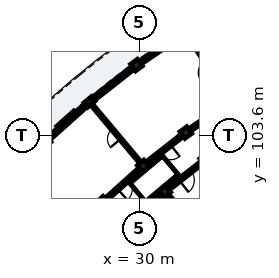
"""IFC4 building model, lengths in metres.
Left out: names, types, materials, properties, quantities, classifications, styles, units other than length and angle.
Written with IfcOpenShell. Run it as: python <this file> out.ifc"""

import sys

from ifc_helpers import new_model, si_unit, direction, frame, frame_2d, origin, origin_2d, place, context, subcontext, project, spatial, rectangle, extrude, element, fill, save


model = new_model("IFC4")
c1 = context("Model", 3, precision=1e-05, world=origin(), true_north=direction((0.0, 1.0)))
c2 = subcontext(c1, "Body", "Model", "MODEL_VIEW")
j1 = project(units=[si_unit("LENGTHUNIT", "METRE"), si_unit("PLANEANGLEUNIT", "RADIAN")], contexts=[c1])
p1 = place(None, origin())
s1 = spatial("IfcSite", under=j1, at=p1, CompositionType="ELEMENT")
p2 = place(p1, origin())
s2 = spatial("IfcBuilding", under=s1, at=p2, CompositionType="ELEMENT")
p3 = place(p2, frame((0.0, 0.0, 15.56)))
s3 = spatial("IfcBuildingStorey", under=s2, at=p3, CompositionType="ELEMENT", Elevation=15.56)
for number, where, z_axis, x_axis in (
    (1, (33.061, 103.804, 0.0), (0.0, 0.0, 1.0), (-0.591, 0.807, 0.0)),
    (2, (29.811, 108.241, 0.0), (0.0, 0.0, 1.0), (-0.591, 0.807, 0.0)),
    (3, (31.671, 99.919, 0.0), (0.0, 0.0, 1.0), (-0.643, 0.766, 0.0)),
    (4, (30.257, 101.605, 0.0), (0.0, 0.0, 1.0), (-0.643, 0.766, 0.0)),
):
    element("IfcColumn", number, at=place(p3, frame(where, z_axis=z_axis, x_axis=x_axis)), inside=s3, PredefinedType="COLUMN", context=c2, shape_type="SweptSolid", body=[
        extrude(rectangle(XDim=0.55, YDim=0.55, at=origin_2d()), origin(), (0.0, 0.0, 1.0), 3.11),
    ])
p4 = place(p3, frame((26.722, 105.818, 0.0), z_axis=(0.0, 0.0, 1.0), x_axis=(-0.642787636427, 0.766044420681, 0.0)))
e5 = element("IfcColumn", 5, at=p4, inside=s3, PredefinedType="PILASTER", context=c2, shape_type="SweptSolid", body=[
    extrude(rectangle(XDim=0.38, YDim=0.62, at=origin_2d()), origin(), (0.0, 0.0, 1.0), 3.11),
])
p5 = place(p3, frame((27.605, 99.226, 0.0), z_axis=(0.0, 0.0, 1.0), x_axis=(-0.691863214436, 0.722028595355, 0.0)))
e6 = element("IfcColumn", 6, at=p5, inside=s3, PredefinedType="COLUMN", context=c2, shape_type="SweptSolid", body=[
    extrude(rectangle(XDim=0.55, YDim=0.55, at=origin_2d()), origin(), (0.0, 0.0, 1.0), 3.11),
])
p6 = place(p3, frame((32.92, 110.365, 0.0), z_axis=(0.0, 0.0, 1.0), x_axis=(-0.825745840472, -0.56404238045, 0.0)))
e7 = element("IfcWall", 7, at=p6, inside=s3, PredefinedType="SOLIDWALL", context=c2, shape_type="SweptSolid", body=[
    extrude(rectangle(XDim=3.521, YDim=0.245, at=frame_2d((1.76, 0.0))), origin(), (0.0, 0.0, 1.0), 2.355),
])
p7 = place(p6, frame((1.08, 0.0, 0.55)))
e8 = element("IfcOpeningElement", 8, at=p7, cuts=e7, PredefinedType="OPENING", context=c2, shape_type="SweptSolid", body=[
    extrude(rectangle(XDim=1.36, YDim=1.61, at=frame_2d((0.68, 0.805))), frame((0.0, 0.133, 0.0), z_axis=(0.0, -1.0, 0.0), x_axis=(1.0, 0.0, 0.0)), (0.0, 0.0, 1.0), 0.265),
])
p8 = place(p3, frame((29.618, 108.09, 0.0), z_axis=(0.0, 0.0, 1.0), x_axis=(-0.786813798172, -0.617190446301, 0.0)))
e9 = element("IfcWall", 9, at=p8, inside=s3, PredefinedType="SOLIDWALL", context=c2, shape_type="SweptSolid", body=[
    extrude(rectangle(XDim=3.521, YDim=0.245, at=frame_2d((1.76, 0.0))), origin(), (0.0, 0.0, 1.0), 2.355),
])
p9 = place(p8, frame((1.02, 0.0, 0.55)))
e10 = element("IfcOpeningElement", 10, at=p9, cuts=e9, PredefinedType="OPENING", context=c2, shape_type="SweptSolid", body=[
    extrude(rectangle(XDim=1.48, YDim=1.46, at=frame_2d((0.74, 0.73))), frame((0.0, 0.133, 0.0), z_axis=(0.0, -1.0, 0.0), x_axis=(1.0, 0.0, 0.0)), (0.0, 0.0, 1.0), 0.265),
])
p10 = place(p3, frame((26.603, 105.711, 0.0), z_axis=(0.0, 0.0, 1.0), x_axis=(-0.744413726571, -0.667718656092, 0.0)))
e11 = element("IfcWall", 11, at=p10, inside=s3, PredefinedType="SOLIDWALL", context=c2, shape_type="SweptSolid", body=[
    extrude(rectangle(XDim=3.521, YDim=0.245, at=frame_2d((1.76, 0.0))), origin(), (0.0, 0.0, 1.0), 2.355),
])
p11 = place(p10, frame((0.96, 0.0, 0.55)))
e12 = element("IfcOpeningElement", 12, at=p11, cuts=e11, PredefinedType="OPENING", context=c2, shape_type="SweptSolid", body=[
    extrude(rectangle(XDim=1.6, YDim=1.535, at=frame_2d((0.8, 0.768))), frame((0.0, 0.133, 0.0), z_axis=(0.0, -1.0, 0.0), x_axis=(1.0, 0.0, 0.0)), (0.0, 0.0, 1.0), 0.265),
])
p12 = place(p3, frame((35.789, 106.151, 0.0), z_axis=(0.0, 0.0, 1.0), x_axis=(-0.536492262982, 0.843905238614, 0.0)))
e13 = element("IfcWall", 13, at=p12, inside=s3, PredefinedType="PARTITIONING", context=c2, shape_type="SweptSolid", body=[
    extrude(rectangle(XDim=4.7, YDim=0.125, at=frame_2d((2.35, 0.0))), origin(), (0.0, 0.0, 1.0), 2.37),
])
p13 = place(p12, frame((1.905, 0.0, 0.0)))
e14 = element("IfcOpeningElement", 14, at=p13, cuts=e13, PredefinedType="OPENING", context=c2, shape_type="SweptSolid", body=[
    extrude(rectangle(XDim=0.89, YDim=2.1, at=frame_2d((0.445, 1.05))), frame((0.0, 0.073, 0.0), z_axis=(0.0, -1.0, 0.0), x_axis=(1.0, 0.0, 0.0)), (0.0, 0.0, 1.0), 0.145),
])
p14 = place(p3, frame((35.714, 105.616, 0.0), z_axis=(0.0, 0.0, 1.0), x_axis=(-0.825779671787, -0.563992848947, 0.0)))
e15 = element("IfcWall", 15, at=p14, inside=s3, PredefinedType="PARTITIONING", context=c2, shape_type="SweptSolid", body=[
    extrude(rectangle(XDim=2.863, YDim=0.205, at=frame_2d((1.432, 0.0))), origin(), (0.0, 0.0, 1.0), 2.37),
])
p15 = place(p14, frame((0.967, 0.0, 0.0)))
e16 = element("IfcOpeningElement", 16, at=p15, cuts=e15, PredefinedType="OPENING", context=c2, shape_type="SweptSolid", body=[
    extrude(rectangle(XDim=0.93, YDim=2.12, at=frame_2d((0.465, 1.06))), frame((0.0, 0.113, 0.0), z_axis=(0.0, -1.0, 0.0), x_axis=(1.0, 0.0, 0.0)), (0.0, 0.0, 1.0), 0.225),
])
p16 = place(p3, frame((32.785, 103.588, 0.0), z_axis=(0.0, 0.0, 1.0), x_axis=(-0.786806323554, -0.617199975061, 0.0)))
e17 = element("IfcWall", 17, at=p16, inside=s3, PredefinedType="PARTITIONING", context=c2, shape_type="SweptSolid", body=[
    extrude(rectangle(XDim=2.863, YDim=0.205, at=frame_2d((1.432, 0.0))), origin(), (0.0, 0.0, 1.0), 2.37),
])
p17 = place(p16, frame((0.937, 0.0, 0.0)))
e18 = element("IfcOpeningElement", 18, at=p17, cuts=e17, PredefinedType="OPENING", context=c2, shape_type="SweptSolid", body=[
    extrude(rectangle(XDim=0.99, YDim=2.16, at=frame_2d((0.495, 1.08))), frame((0.0, 0.113, 0.0), z_axis=(0.0, -1.0, 0.0), x_axis=(1.0, 0.0, 0.0)), (0.0, 0.0, 1.0), 0.225),
])
p18 = place(p3, frame((34.085, 101.813, 0.0), z_axis=(0.0, 0.0, 1.0), x_axis=(-0.786835457019, -0.617162833924, 0.0)))
e19 = element("IfcWall", 19, at=p18, inside=s3, PredefinedType="PARTITIONING", context=c2, shape_type="SweptSolid", body=[
    extrude(rectangle(XDim=2.718, YDim=0.205, at=frame_2d((1.359, 0.0))), origin(), (0.0, 0.0, 1.0), 2.37),
])
p19 = place(p18, frame((0.864, 0.0, 0.0)))
e20 = element("IfcOpeningElement", 20, at=p19, cuts=e19, PredefinedType="OPENING", context=c2, shape_type="SweptSolid", body=[
    extrude(rectangle(XDim=0.99, YDim=2.16, at=frame_2d((0.495, 1.08))), frame((0.0, 0.113, 0.0), z_axis=(0.0, -1.0, 0.0), x_axis=(1.0, 0.0, 0.0)), (0.0, 0.0, 1.0), 0.225),
])
p20 = place(p3, frame((30.0, 101.911, 0.0), z_axis=(0.0, 0.0, 1.0), x_axis=(-0.642811926223, 0.766024038465, 0.0)))
e21 = element("IfcWall", 21, at=p20, inside=s3, PredefinedType="PLUMBINGWALL", context=c2, shape_type="SweptSolid", body=[
    extrude(rectangle(XDim=4.7, YDim=0.14, at=frame_2d((2.35, 0.0))), origin(), (0.0, 0.0, 1.0), 2.37),
])
p21 = place(p20, frame((1.92, 0.0, 0.0)))
e22 = element("IfcOpeningElement", 22, at=p21, cuts=e21, PredefinedType="OPENING", context=c2, shape_type="SweptSolid", body=[
    extrude(rectangle(XDim=0.86, YDim=2.06, at=frame_2d((0.43, 1.03))), frame((0.0, 0.08, 0.0), z_axis=(0.0, -1.0, 0.0), x_axis=(1.0, 0.0, 0.0)), (0.0, 0.0, 1.0), 0.16),
])
p22 = place(p3, frame((36.171, 94.557, 0.0), z_axis=(0.0, 0.0, 1.0), x_axis=(-0.642789470807, 0.766042881449, 0.0)))
e23 = element("IfcWall", 23, at=p22, inside=s3, PredefinedType="PARTITIONING", context=c2, shape_type="SweptSolid", body=[
    extrude(rectangle(XDim=6.6, YDim=0.185, at=frame_2d((3.3, 0.0))), origin(), (0.0, 0.0, 1.0), 2.37),
])
p23 = place(p3, frame((29.997, 101.371, 0.0), z_axis=(0.0, 0.0, 1.0), x_axis=(-0.744433521088, -0.667696587291, 0.0)))
e24 = element("IfcWall", 24, at=p23, inside=s3, PredefinedType="PARTITIONING", context=c2, shape_type="SweptSolid", body=[
    extrude(rectangle(XDim=2.863, YDim=0.205, at=frame_2d((1.432, 0.0))), origin(), (0.0, 0.0, 1.0), 2.37),
])
p24 = place(p23, frame((0.947, 0.0, 0.0)))
e25 = element("IfcOpeningElement", 25, at=p24, cuts=e24, PredefinedType="OPENING", context=c2, shape_type="SweptSolid", body=[
    extrude(rectangle(XDim=0.97, YDim=2.15, at=frame_2d((0.485, 1.075))), frame((0.0, 0.113, 0.0), z_axis=(0.0, -1.0, 0.0), x_axis=(1.0, 0.0, 0.0)), (0.0, 0.0, 1.0), 0.225),
])
p25 = place(p3, frame((31.411, 99.686, 0.0), z_axis=(0.0, 0.0, 1.0), x_axis=(-0.744418559135, -0.667713268413, 0.0)))
e26 = element("IfcWall", 26, at=p25, inside=s3, PredefinedType="PARTITIONING", context=c2, shape_type="SweptSolid", body=[
    extrude(rectangle(XDim=2.718, YDim=0.205, at=frame_2d((1.359, 0.0))), origin(), (0.0, 0.0, 1.0), 2.37),
])
p26 = place(p25, frame((0.874, 0.0, 0.0)))
e27 = element("IfcOpeningElement", 27, at=p26, cuts=e26, PredefinedType="OPENING", context=c2, shape_type="SweptSolid", body=[
    extrude(rectangle(XDim=0.97, YDim=2.15, at=frame_2d((0.485, 1.075))), frame((0.0, 0.113, 0.0), z_axis=(0.0, -1.0, 0.0), x_axis=(1.0, 0.0, 0.0)), (0.0, 0.0, 1.0), 0.225),
])
p27 = place(p3, frame((24.82, 96.947, 0.0), z_axis=(0.0, 0.0, 1.0), x_axis=(-0.737934199263, 0.674872667663, 0.0)))
e28 = element("IfcWall", 28, at=p27, inside=s3, PredefinedType="PARTITIONING", context=c2, shape_type="SweptSolid", body=[
    extrude(rectangle(XDim=4.7, YDim=0.125, at=frame_2d((2.35, 0.0))), origin(), (0.0, 0.0, 1.0), 2.37),
])
p28 = place(p27, frame((1.915, 0.0, 0.0)))
e29 = element("IfcOpeningElement", 29, at=p28, cuts=e28, PredefinedType="OPENING", context=c2, shape_type="SweptSolid", body=[
    extrude(rectangle(XDim=0.87, YDim=2.08, at=frame_2d((0.435, 1.04))), frame((0.0, 0.073, 0.0), z_axis=(0.0, -1.0, 0.0), x_axis=(1.0, 0.0, 0.0)), (0.0, 0.0, 1.0), 0.145),
])
p29 = place(p7, origin())
e30 = element("IfcWindow", 30, at=p29, inside=s3, PartitioningType="SINGLE_PANEL", PredefinedType="WINDOW", context=c2, shape_type="SweptSolid", body=[
    extrude(rectangle(XDim=1.36, YDim=1.61, at=frame_2d((0.68, 0.805))), frame((0.0, 0.03, 0.0), z_axis=(0.0, -1.0, 0.0), x_axis=(1.0, 0.0, 0.0)), (0.0, 0.0, 1.0), 0.06),
])
fill(e8, e30)
p30 = place(p9, origin())
e31 = element("IfcWindow", 31, at=p30, inside=s3, PartitioningType="SINGLE_PANEL", PredefinedType="WINDOW", context=c2, shape_type="SweptSolid", body=[
    extrude(rectangle(XDim=1.48, YDim=1.46, at=frame_2d((0.74, 0.73))), frame((0.0, 0.03, 0.0), z_axis=(0.0, -1.0, 0.0), x_axis=(1.0, 0.0, 0.0)), (0.0, 0.0, 1.0), 0.06),
])
fill(e10, e31)
p31 = place(p11, origin())
e32 = element("IfcWindow", 32, at=p31, inside=s3, PartitioningType="SINGLE_PANEL", PredefinedType="WINDOW", context=c2, shape_type="SweptSolid", body=[
    extrude(rectangle(XDim=1.6, YDim=1.535, at=frame_2d((0.8, 0.768))), frame((0.0, 0.03, 0.0), z_axis=(0.0, -1.0, 0.0), x_axis=(1.0, 0.0, 0.0)), (0.0, 0.0, 1.0), 0.06),
])
fill(e12, e32)
p32 = place(p17, origin())
e33 = element("IfcDoor", 33, at=p32, inside=s3, OperationType="SINGLE_SWING_LEFT", PredefinedType="DOOR", context=c2, shape_type="SweptSolid", body=[
    extrude(rectangle(XDim=0.99, YDim=2.16, at=frame_2d((0.495, 1.08))), frame((0.0, 0.025, 0.0), z_axis=(0.0, -1.0, 0.0), x_axis=(1.0, 0.0, 0.0)), (0.0, 0.0, 1.0), 0.05),
])
fill(e18, e33)
p33 = place(p19, origin())
e34 = element("IfcDoor", 34, at=p33, inside=s3, OperationType="SINGLE_SWING_RIGHT", PredefinedType="DOOR", context=c2, shape_type="SweptSolid", body=[
    extrude(rectangle(XDim=0.99, YDim=2.16, at=frame_2d((0.495, 1.08))), frame((0.0, 0.025, 0.0), z_axis=(0.0, -1.0, 0.0), x_axis=(1.0, 0.0, 0.0)), (0.0, 0.0, 1.0), 0.05),
])
fill(e20, e34)
p34 = place(p21, origin())
e35 = element("IfcDoor", 35, at=p34, inside=s3, OperationType="SINGLE_SWING_LEFT", PredefinedType="DOOR", context=c2, shape_type="SweptSolid", body=[
    extrude(rectangle(XDim=0.86, YDim=2.06, at=frame_2d((0.43, 1.03))), frame((0.0, 0.025, 0.0), z_axis=(0.0, -1.0, 0.0), x_axis=(1.0, 0.0, 0.0)), (0.0, 0.0, 1.0), 0.05),
])
fill(e22, e35)
p35 = place(p24, origin())
e36 = element("IfcDoor", 36, at=p35, inside=s3, OperationType="SINGLE_SWING_RIGHT", PredefinedType="DOOR", context=c2, shape_type="SweptSolid", body=[
    extrude(rectangle(XDim=0.97, YDim=2.15, at=frame_2d((0.485, 1.075))), frame((0.0, 0.025, 0.0), z_axis=(0.0, -1.0, 0.0), x_axis=(1.0, 0.0, 0.0)), (0.0, 0.0, 1.0), 0.05),
])
fill(e25, e36)
save(model, sys.argv[1])
